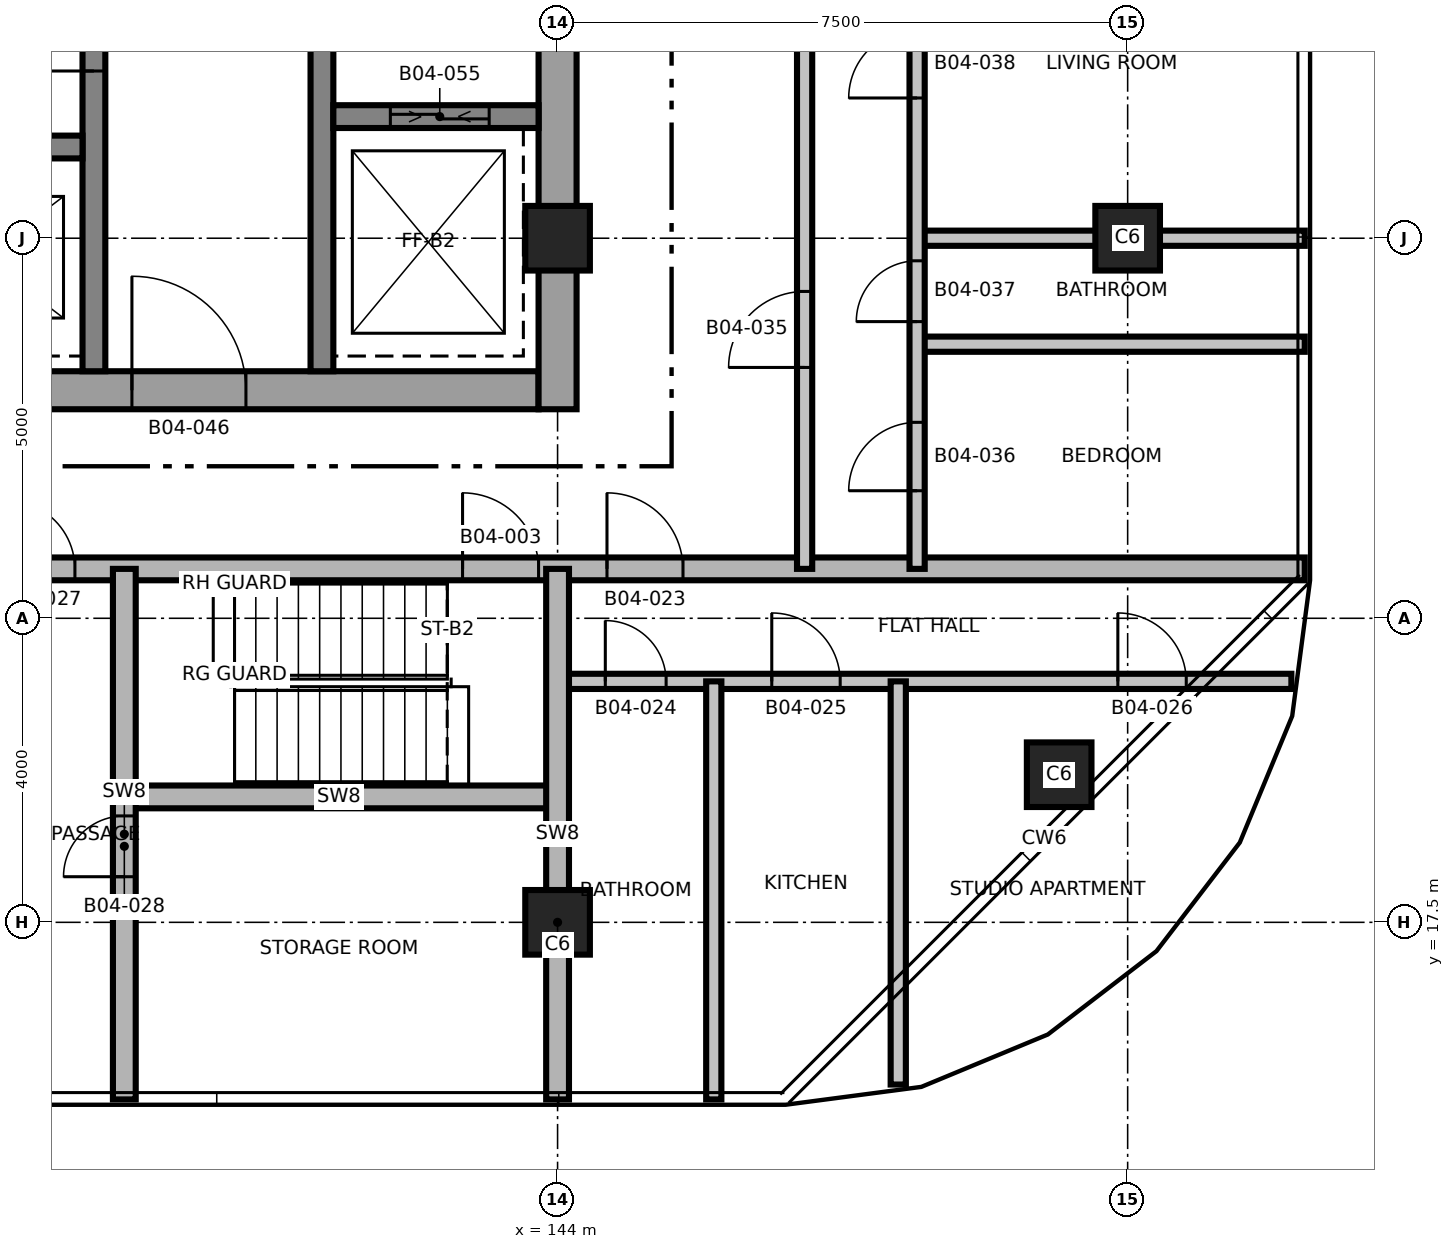
"""IFC4 building model, lengths in metres.
Left out: names, types, materials, properties, quantities, classifications, styles, units other than length and angle.
Written with IfcOpenShell. Run it as: python <this file> out.ifc"""

import sys

from ifc_helpers import new_model, si_unit, direction, frame, frame_2d, origin, origin_2d, place, context, subcontext, project, spatial, rectangle, extrude, element, fill, save


model = new_model("IFC4")
c1 = context("Model", 3, precision=1e-05, world=origin(), true_north=direction((0.0, 1.0)))
c2 = subcontext(c1, "Body", "Model", "MODEL_VIEW")
j1 = project(units=[si_unit("LENGTHUNIT", "METRE"), si_unit("PLANEANGLEUNIT", "RADIAN")], contexts=[c1])
p1 = place(None, origin())
s1 = spatial("IfcSite", under=j1, at=p1, CompositionType="ELEMENT")
p2 = place(p1, origin())
s2 = spatial("IfcBuilding", under=s1, at=p2, CompositionType="ELEMENT")
p3 = place(p2, frame((0.0, 0.0, 66.8)))
s3 = spatial("IfcBuildingStorey", under=s2, at=p3, CompositionType="ELEMENT", Elevation=66.8)
p4 = place(p3, frame((128.75, 24.5, 0.0), z_axis=(0.0, 0.0, 1.0), x_axis=(1.0, 0.0, 0.0)))
e1 = element("IfcWall", 1, at=p4, inside=s3, PredefinedType="SHEAR", context=c2, shape_type="SweptSolid", body=[
    extrude(rectangle(XDim=15.0, YDim=0.5, at=frame_2d((7.5, 0.0))), origin(), (0.0, 0.0, 1.0), 3.7),
])
p5 = place(p4, frame((9.65, 0.0, 0.0)))
e2 = element("IfcOpeningElement", 2, at=p5, cuts=e1, PredefinedType="OPENING", context=c2, shape_type="SweptSolid", body=[
    extrude(rectangle(XDim=1.5, YDim=2.1, at=frame_2d((0.75, 1.05))), frame((0.0, 0.26, 0.0), z_axis=(0.0, -1.0, 0.0), x_axis=(1.0, 0.0, 0.0)), (0.0, 0.0, 1.0), 0.52),
])
p6 = place(p4, frame((1.25, 0.0, 0.0)))
e3 = element("IfcOpeningElement", 3, at=p6, cuts=e1, PredefinedType="OPENING", context=c2, shape_type="SweptSolid", body=[
    extrude(rectangle(XDim=0.9, YDim=2.1, at=frame_2d((0.45, 1.05))), frame((0.0, 0.26, 0.0), z_axis=(0.0, -1.0, 0.0), x_axis=(1.0, 0.0, 0.0)), (0.0, 0.0, 1.0), 0.52),
])
p7 = place(p3, frame((144.0, 24.25, 0.0), z_axis=(0.0, 0.0, 1.0), x_axis=(0.0, 1.0, 0.0)))
e4 = element("IfcWall", 4, at=p7, inside=s3, PredefinedType="SHEAR", context=c2, shape_type="SweptSolid", body=[
    extrude(rectangle(XDim=13.5, YDim=0.5, at=frame_2d((6.75, 0.0))), origin(), (0.0, 0.0, 1.0), 3.7),
])
p8 = place(p3, frame((137.9, 24.75, 0.0), z_axis=(0.0, 0.0, 1.0), x_axis=(0.0, 1.0, 0.0)))
e5 = element("IfcWall", 5, at=p8, inside=s3, PredefinedType="SHEAR", context=c2, shape_type="SweptSolid", body=[
    extrude(rectangle(XDim=12.5, YDim=0.3, at=frame_2d((6.25, 0.0))), origin(), (0.0, 0.0, 1.0), 3.7),
])
p9 = place(p8, frame((3.95, 0.0, 0.0)))
e6 = element("IfcOpeningElement", 6, at=p9, cuts=e5, PredefinedType="OPENING", context=c2, shape_type="SweptSolid", body=[
    extrude(rectangle(XDim=1.5, YDim=2.1, at=frame_2d((0.75, 1.05))), frame((0.0, 0.16, 0.0), z_axis=(0.0, -1.0, 0.0), x_axis=(1.0, 0.0, 0.0)), (0.0, 0.0, 1.0), 0.32),
])
p10 = place(p8, frame((10.45, 0.0, 0.0)))
e7 = element("IfcOpeningElement", 7, at=p10, cuts=e5, PredefinedType="OPENING", context=c2, shape_type="SweptSolid", body=[
    extrude(rectangle(XDim=0.9, YDim=2.1, at=frame_2d((0.45, 1.05))), frame((0.0, 0.16, 0.0), z_axis=(0.0, -1.0, 0.0), x_axis=(1.0, 0.0, 0.0)), (0.0, 0.0, 1.0), 0.32),
])
p11 = place(p3, frame((140.9, 24.75, 0.0), z_axis=(0.0, 0.0, 1.0), x_axis=(0.0, 1.0, 0.0)))
e8 = element("IfcWall", 8, at=p11, inside=s3, PredefinedType="SHEAR", context=c2, shape_type="SweptSolid", body=[
    extrude(rectangle(XDim=12.5, YDim=0.3, at=frame_2d((6.25, 0.0))), origin(), (0.0, 0.0, 1.0), 3.7),
])
p12 = place(p11, frame((5.9, 0.0, 0.0)))
e9 = element("IfcOpeningElement", 9, at=p12, cuts=e8, PredefinedType="OPENING", context=c2, shape_type="SweptSolid", body=[
    extrude(rectangle(XDim=1.2, YDim=2.1, at=frame_2d((0.6, 1.05))), frame((0.0, 0.16, 0.0), z_axis=(0.0, -1.0, 0.0), x_axis=(1.0, 0.0, 0.0)), (0.0, 0.0, 1.0), 0.32),
])
p13 = place(p3, frame((132.25, 27.7, 0.0), z_axis=(0.0, 0.0, 1.0), x_axis=(1.0, 0.0, 0.0)))
e10 = element("IfcWall", 10, at=p13, inside=s3, PredefinedType="SHEAR", context=c2, shape_type="SweptSolid", body=[
    extrude(rectangle(XDim=5.5, YDim=0.3, at=frame_2d((2.75, 0.0))), origin(), (0.0, 0.0, 1.0), 3.7),
])
p14 = place(p13, frame((0.9, 0.0, 0.0)))
e11 = element("IfcOpeningElement", 11, at=p14, cuts=e10, PredefinedType="OPENING", context=c2, shape_type="SweptSolid", body=[
    extrude(rectangle(XDim=1.1, YDim=2.4, at=frame_2d((0.55, 1.2))), frame((0.0, 0.16, 0.0), z_axis=(0.0, -1.0, 0.0), x_axis=(1.0, 0.0, 0.0)), (0.0, 0.0, 1.0), 0.32),
])
p15 = place(p13, frame((3.8, 0.0, 0.0)))
e12 = element("IfcOpeningElement", 12, at=p15, cuts=e10, PredefinedType="OPENING", context=c2, shape_type="SweptSolid", body=[
    extrude(rectangle(XDim=1.1, YDim=2.4, at=frame_2d((0.55, 1.2))), frame((0.0, 0.16, 0.0), z_axis=(0.0, -1.0, 0.0), x_axis=(1.0, 0.0, 0.0)), (0.0, 0.0, 1.0), 0.32),
])
p16 = place(p3, frame((141.05, 28.1, 0.0), z_axis=(0.0, 0.0, 1.0), x_axis=(1.0, 0.0, 0.0)))
e13 = element("IfcWall", 13, at=p16, inside=s3, PredefinedType="SHEAR", context=c2, shape_type="SweptSolid", body=[
    extrude(rectangle(XDim=2.7, YDim=0.3, at=frame_2d((1.35, 0.0))), origin(), (0.0, 0.0, 1.0), 3.7),
])
p17 = place(p16, frame((0.75, 0.0, 0.0)))
e14 = element("IfcOpeningElement", 14, at=p17, cuts=e13, PredefinedType="OPENING", context=c2, shape_type="SweptSolid", body=[
    extrude(rectangle(XDim=1.3, YDim=2.4, at=frame_2d((0.65, 1.2))), frame((0.0, 0.16, 0.0), z_axis=(0.0, -1.0, 0.0), x_axis=(1.0, 0.0, 0.0)), (0.0, 0.0, 1.0), 0.32),
])
for number, where, z_axis, x_axis in (
    (15, (144.0, 17.5, 0.0), (0.0, 0.0, 1.0), (1.0, 0.0, 0.0)),
    (16, (150.599, 19.442, 0.0), (0.0, 0.0, 1.0), (1.0, 0.0, 0.0)),
    (17, (144.0, 26.5, 0.0), (0.0, 0.0, 1.0), (1.0, 0.0, 0.0)),
    (18, (151.5, 26.5, 0.0), (0.0, 0.0, 1.0), (1.0, 0.0, 0.0)),
):
    element("IfcColumn", number, at=place(p3, frame(where, z_axis=z_axis, x_axis=x_axis)), inside=s3, PredefinedType="COLUMN", context=c2, shape_type="SweptSolid", body=[
        extrude(rectangle(XDim=0.85, YDim=0.85, at=origin_2d()), origin(), (0.0, 0.0, 1.0), 3.7),
    ])
p18 = place(p3, frame((138.25, 19.15, 0.0), z_axis=(0.0, 0.0, 1.0), x_axis=(1.0, 0.0, 0.0)))
e19 = element("IfcWall", 19, at=p18, inside=s3, PredefinedType="SHEAR", context=c2, shape_type="SweptSolid", body=[
    extrude(rectangle(XDim=5.75, YDim=0.3, at=frame_2d((2.875, 0.0))), origin(), (0.0, 0.0, 1.0), 3.4),
])
p19 = place(p3, frame((144.0, 20.67, 0.0), z_axis=(0.0, 0.0, 1.0), x_axis=(1.0, 0.0, 0.0)))
e20 = element("IfcWall", 20, at=p19, inside=s3, PredefinedType="PARTITIONING", context=c2, shape_type="SweptSolid", body=[
    extrude(rectangle(XDim=9.654, YDim=0.2, at=frame_2d((4.827, 0.0))), origin(), (0.0, 0.0, 1.0), 3.4),
])
p20 = place(p19, frame((0.628, 0.0, 0.0)))
e21 = element("IfcOpeningElement", 21, at=p20, cuts=e20, PredefinedType="OPENING", context=c2, shape_type="SweptSolid", body=[
    extrude(rectangle(XDim=0.8, YDim=2.1, at=frame_2d((0.4, 1.05))), frame((0.0, 0.11, 0.0), z_axis=(0.0, -1.0, 0.0), x_axis=(1.0, 0.0, 0.0)), (0.0, 0.0, 1.0), 0.22),
])
p21 = place(p19, frame((2.818, 0.0, 0.0)))
e22 = element("IfcOpeningElement", 22, at=p21, cuts=e20, PredefinedType="OPENING", context=c2, shape_type="SweptSolid", body=[
    extrude(rectangle(XDim=0.9, YDim=2.1, at=frame_2d((0.45, 1.05))), frame((0.0, 0.11, 0.0), z_axis=(0.0, -1.0, 0.0), x_axis=(1.0, 0.0, 0.0)), (0.0, 0.0, 1.0), 0.22),
])
p22 = place(p19, frame((7.371, 0.0, 0.0)))
e23 = element("IfcOpeningElement", 23, at=p22, cuts=e20, PredefinedType="OPENING", context=c2, shape_type="SweptSolid", body=[
    extrude(rectangle(XDim=0.9, YDim=2.1, at=frame_2d((0.45, 1.05))), frame((0.0, 0.11, 0.0), z_axis=(0.0, -1.0, 0.0), x_axis=(1.0, 0.0, 0.0)), (0.0, 0.0, 1.0), 0.22),
])
p23 = place(p3, frame((119.17, 22.15, 0.0), z_axis=(0.0, 0.0, 1.0), x_axis=(1.0, 0.0, 0.0)))
e24 = element("IfcWall", 24, at=p23, inside=s3, PredefinedType="SHEAR", context=c2, shape_type="SweptSolid", body=[
    extrude(rectangle(XDim=34.66, YDim=0.3, at=frame_2d((17.33, 0.0))), origin(), (0.0, 0.0, 1.0), 3.4),
])
p24 = place(p23, frame((23.58, 0.0, 0.0)))
e25 = element("IfcOpeningElement", 25, at=p24, cuts=e24, PredefinedType="OPENING", context=c2, shape_type="SweptSolid", body=[
    extrude(rectangle(XDim=1.0, YDim=2.1, at=frame_2d((0.5, 1.05))), frame((0.0, 0.16, 0.0), z_axis=(0.0, -1.0, 0.0), x_axis=(1.0, 0.0, 0.0)), (0.0, 0.0, 1.0), 0.32),
])
p25 = place(p23, frame((11.93, 0.0, 0.0)))
e26 = element("IfcOpeningElement", 26, at=p25, cuts=e24, PredefinedType="OPENING", context=c2, shape_type="SweptSolid", body=[
    extrude(rectangle(XDim=1.0, YDim=2.1, at=frame_2d((0.5, 1.05))), frame((0.0, 0.16, 0.0), z_axis=(0.0, -1.0, 0.0), x_axis=(1.0, 0.0, 0.0)), (0.0, 0.0, 1.0), 0.32),
])
p26 = place(p23, frame((25.48, 0.0, 0.0)))
e27 = element("IfcOpeningElement", 27, at=p26, cuts=e24, PredefinedType="OPENING", context=c2, shape_type="SweptSolid", body=[
    extrude(rectangle(XDim=1.0, YDim=2.1, at=frame_2d((0.5, 1.05))), frame((0.0, 0.16, 0.0), z_axis=(0.0, -1.0, 0.0), x_axis=(1.0, 0.0, 0.0)), (0.0, 0.0, 1.0), 0.32),
])
p27 = place(p23, frame((17.58, 0.0, 0.0)))
e28 = element("IfcOpeningElement", 28, at=p27, cuts=e24, PredefinedType="OPENING", context=c2, shape_type="SweptSolid", body=[
    extrude(rectangle(XDim=0.9, YDim=2.1, at=frame_2d((0.45, 1.05))), frame((0.0, 0.16, 0.0), z_axis=(0.0, -1.0, 0.0), x_axis=(1.0, 0.0, 0.0)), (0.0, 0.0, 1.0), 0.32),
])
for number, where, z_axis, x_axis in (
    (29, (148.73, 25.106, 0.0), (0.0, 0.0, 1.0), (1.0, 0.0, 0.0)),
    (30, (148.73, 26.5, 0.0), (0.0, 0.0, 1.0), (1.0, 0.0, 0.0)),
):
    element("IfcWall", number, at=place(p3, frame(where, z_axis=z_axis, x_axis=x_axis)), inside=s3, PredefinedType="PARTITIONING", context=c2, shape_type="SweptSolid", body=[
        extrude(rectangle(XDim=5.1, YDim=0.2, at=frame_2d((2.55, 0.0))), origin(), (0.0, 0.0, 1.0), 3.4),
    ])
p28 = place(p3, frame((138.3, 15.17, 0.0), z_axis=(0.0, 0.0, 1.0), x_axis=(0.0, 1.0, 0.0)))
e31 = element("IfcWall", 31, at=p28, inside=s3, PredefinedType="SHEAR", context=c2, shape_type="SweptSolid", body=[
    extrude(rectangle(XDim=6.98, YDim=0.3, at=frame_2d((3.49, 0.0))), origin(), (0.0, 0.0, 1.0), 3.4),
])
p29 = place(p28, frame((2.93, 0.0, 0.0)))
e32 = element("IfcOpeningElement", 32, at=p29, cuts=e31, PredefinedType="OPENING", context=c2, shape_type="SweptSolid", body=[
    extrude(rectangle(XDim=0.8, YDim=2.1, at=frame_2d((0.4, 1.05))), frame((0.0, 0.16, 0.0), z_axis=(0.0, -1.0, 0.0), x_axis=(1.0, 0.0, 0.0)), (0.0, 0.0, 1.0), 0.32),
])
p30 = place(p3, frame((144.0, 15.17, 0.0), z_axis=(0.0, 0.0, 1.0), x_axis=(0.0, 1.0, 0.0)))
e33 = element("IfcWall", 33, at=p30, inside=s3, PredefinedType="SHEAR", context=c2, shape_type="SweptSolid", body=[
    extrude(rectangle(XDim=6.98, YDim=0.3, at=frame_2d((3.49, 0.0))), origin(), (0.0, 0.0, 1.0), 3.4),
])
p31 = place(p3, frame((146.055, 15.17, 0.0), z_axis=(0.0, 0.0, 1.0), x_axis=(0.0, 1.0, 0.0)))
e34 = element("IfcWall", 34, at=p31, inside=s3, PredefinedType="PARTITIONING", context=c2, shape_type="SweptSolid", body=[
    extrude(rectangle(XDim=5.5, YDim=0.2, at=frame_2d((2.75, 0.0))), origin(), (0.0, 0.0, 1.0), 3.4),
])
p32 = place(p3, frame((147.25, 22.15, 0.0), z_axis=(0.0, 0.0, 1.0), x_axis=(0.0, 1.0, 0.0)))
e35 = element("IfcWall", 35, at=p32, inside=s3, PredefinedType="PARTITIONING", context=c2, shape_type="SweptSolid", body=[
    extrude(rectangle(XDim=17.7, YDim=0.2, at=frame_2d((8.85, 0.0))), origin(), (0.0, 0.0, 1.0), 3.4),
])
p33 = place(p32, frame((2.65, 0.0, 0.0)))
e36 = element("IfcOpeningElement", 36, at=p33, cuts=e35, PredefinedType="OPENING", context=c2, shape_type="SweptSolid", body=[
    extrude(rectangle(XDim=1.0, YDim=2.1, at=frame_2d((0.5, 1.05))), frame((0.0, 0.11, 0.0), z_axis=(0.0, -1.0, 0.0), x_axis=(1.0, 0.0, 0.0)), (0.0, 0.0, 1.0), 0.22),
])
p34 = place(p3, frame((148.482, 15.366, 0.0), z_axis=(0.0, 0.0, 1.0), x_axis=(0.0, 1.0, 0.0)))
e37 = element("IfcWall", 37, at=p34, inside=s3, PredefinedType="PARTITIONING", context=c2, shape_type="SweptSolid", body=[
    extrude(rectangle(XDim=5.304, YDim=0.2, at=frame_2d((2.652, 0.0))), origin(), (0.0, 0.0, 1.0), 3.4),
])
p35 = place(p3, frame((148.73, 22.15, 0.0), z_axis=(0.0, 0.0, 1.0), x_axis=(0.0, 1.0, 0.0)))
e38 = element("IfcWall", 38, at=p35, inside=s3, PredefinedType="PARTITIONING", context=c2, shape_type="SweptSolid", body=[
    extrude(rectangle(XDim=17.7, YDim=0.2, at=frame_2d((8.85, 0.0))), origin(), (0.0, 0.0, 1.0), 3.4),
])
p36 = place(p35, frame((1.028, 0.0, 0.0)))
e39 = element("IfcOpeningElement", 39, at=p36, cuts=e38, PredefinedType="OPENING", context=c2, shape_type="SweptSolid", body=[
    extrude(rectangle(XDim=0.9, YDim=2.1, at=frame_2d((0.45, 1.05))), frame((0.0, 0.11, 0.0), z_axis=(0.0, -1.0, 0.0), x_axis=(1.0, 0.0, 0.0)), (0.0, 0.0, 1.0), 0.22),
])
p37 = place(p35, frame((3.253, 0.0, 0.0)))
e40 = element("IfcOpeningElement", 40, at=p37, cuts=e38, PredefinedType="OPENING", context=c2, shape_type="SweptSolid", body=[
    extrude(rectangle(XDim=0.8, YDim=2.1, at=frame_2d((0.4, 1.05))), frame((0.0, 0.11, 0.0), z_axis=(0.0, -1.0, 0.0), x_axis=(1.0, 0.0, 0.0)), (0.0, 0.0, 1.0), 0.22),
])
p38 = place(p35, frame((6.195, 0.0, 0.0)))
e41 = element("IfcOpeningElement", 41, at=p38, cuts=e38, PredefinedType="OPENING", context=c2, shape_type="SweptSolid", body=[
    extrude(rectangle(XDim=0.9, YDim=2.1, at=frame_2d((0.45, 1.05))), frame((0.0, 0.11, 0.0), z_axis=(0.0, -1.0, 0.0), x_axis=(1.0, 0.0, 0.0)), (0.0, 0.0, 1.0), 0.22),
])
p39 = place(p35, frame((9.641, 0.0, 0.0)))
e42 = element("IfcOpeningElement", 42, at=p39, cuts=e38, PredefinedType="OPENING", context=c2, shape_type="SweptSolid", body=[
    extrude(rectangle(XDim=0.9, YDim=2.1, at=frame_2d((0.45, 1.05))), frame((0.0, 0.11, 0.0), z_axis=(0.0, -1.0, 0.0), x_axis=(1.0, 0.0, 0.0)), (0.0, 0.0, 1.0), 0.22),
])
p40 = place(p35, frame((11.895, 0.0, 0.0)))
e43 = element("IfcOpeningElement", 43, at=p40, cuts=e38, PredefinedType="OPENING", context=c2, shape_type="SweptSolid", body=[
    extrude(rectangle(XDim=0.8, YDim=2.1, at=frame_2d((0.4, 1.05))), frame((0.0, 0.11, 0.0), z_axis=(0.0, -1.0, 0.0), x_axis=(1.0, 0.0, 0.0)), (0.0, 0.0, 1.0), 0.22),
])
p41 = place(p35, frame((15.075, 0.0, 0.0)))
e44 = element("IfcOpeningElement", 44, at=p41, cuts=e38, PredefinedType="OPENING", context=c2, shape_type="SweptSolid", body=[
    extrude(rectangle(XDim=0.9, YDim=2.1, at=frame_2d((0.45, 1.05))), frame((0.0, 0.11, 0.0), z_axis=(0.0, -1.0, 0.0), x_axis=(1.0, 0.0, 0.0)), (0.0, 0.0, 1.0), 0.22),
])
p42 = place(p24, origin())
e45 = element("IfcDoor", 45, at=p42, inside=s3, OperationType="SINGLE_SWING_LEFT", PredefinedType="DOOR", context=c2, shape_type="SweptSolid", body=[
    extrude(rectangle(XDim=1.0, YDim=2.1, at=frame_2d((0.5, 1.05))), frame((0.0, 0.025, 0.0), z_axis=(0.0, -1.0, 0.0), x_axis=(1.0, 0.0, 0.0)), (0.0, 0.0, 1.0), 0.05),
])
fill(e25, e45)
p43 = place(p26, origin())
e46 = element("IfcDoor", 46, at=p43, inside=s3, OperationType="SINGLE_SWING_LEFT", PredefinedType="DOOR", context=c2, shape_type="SweptSolid", body=[
    extrude(rectangle(XDim=1.0, YDim=2.1, at=frame_2d((0.5, 1.05))), frame((0.0, 0.025, 0.0), z_axis=(0.0, -1.0, 0.0), x_axis=(1.0, 0.0, 0.0)), (0.0, 0.0, 1.0), 0.05),
])
fill(e27, e46)
p44 = place(p20, origin())
e47 = element("IfcDoor", 47, at=p44, inside=s3, OperationType="SINGLE_SWING_RIGHT", PredefinedType="DOOR", context=c2, shape_type="SweptSolid", body=[
    extrude(rectangle(XDim=0.8, YDim=2.1, at=frame_2d((0.4, 1.05))), frame((0.0, 0.025, 0.0), z_axis=(0.0, -1.0, 0.0), x_axis=(1.0, 0.0, 0.0)), (0.0, 0.0, 1.0), 0.05),
])
fill(e21, e47)
p45 = place(p21, origin())
e48 = element("IfcDoor", 48, at=p45, inside=s3, OperationType="SINGLE_SWING_LEFT", PredefinedType="DOOR", context=c2, shape_type="SweptSolid", body=[
    extrude(rectangle(XDim=0.9, YDim=2.1, at=frame_2d((0.45, 1.05))), frame((0.0, 0.025, 0.0), z_axis=(0.0, -1.0, 0.0), x_axis=(1.0, 0.0, 0.0)), (0.0, 0.0, 1.0), 0.05),
])
fill(e22, e48)
p46 = place(p22, origin())
e49 = element("IfcDoor", 49, at=p46, inside=s3, OperationType="SINGLE_SWING_RIGHT", PredefinedType="DOOR", context=c2, shape_type="SweptSolid", body=[
    extrude(rectangle(XDim=0.9, YDim=2.1, at=frame_2d((0.45, 1.05))), frame((0.0, 0.025, 0.0), z_axis=(0.0, -1.0, 0.0), x_axis=(1.0, 0.0, 0.0)), (0.0, 0.0, 1.0), 0.05),
])
fill(e23, e49)
p47 = place(p27, origin())
e50 = element("IfcDoor", 50, at=p47, inside=s3, OperationType="SINGLE_SWING_LEFT", PredefinedType="DOOR", context=c2, shape_type="SweptSolid", body=[
    extrude(rectangle(XDim=0.9, YDim=2.1, at=frame_2d((0.45, 1.05))), frame((0.0, 0.025, 0.0), z_axis=(0.0, -1.0, 0.0), x_axis=(1.0, 0.0, 0.0)), (0.0, 0.0, 1.0), 0.05),
])
fill(e28, e50)
p48 = place(p29, origin())
e51 = element("IfcDoor", 51, at=p48, inside=s3, OperationType="SINGLE_SWING_RIGHT", PredefinedType="DOOR", context=c2, shape_type="SweptSolid", body=[
    extrude(rectangle(XDim=0.8, YDim=2.1, at=frame_2d((0.4, 1.05))), frame((0.0, 0.025, 0.0), z_axis=(0.0, -1.0, 0.0), x_axis=(1.0, 0.0, 0.0)), (0.0, 0.0, 1.0), 0.05),
])
fill(e32, e51)
p49 = place(p33, origin())
e52 = element("IfcDoor", 52, at=p49, inside=s3, OperationType="SINGLE_SWING_LEFT", PredefinedType="DOOR", context=c2, shape_type="SweptSolid", body=[
    extrude(rectangle(XDim=1.0, YDim=2.1, at=frame_2d((0.5, 1.05))), frame((0.0, 0.025, 0.0), z_axis=(0.0, -1.0, 0.0), x_axis=(1.0, 0.0, 0.0)), (0.0, 0.0, 1.0), 0.05),
])
fill(e36, e52)
p50 = place(p36, origin())
e53 = element("IfcDoor", 53, at=p50, inside=s3, OperationType="SINGLE_SWING_RIGHT", PredefinedType="DOOR", context=c2, shape_type="SweptSolid", body=[
    extrude(rectangle(XDim=0.9, YDim=2.1, at=frame_2d((0.45, 1.05))), frame((0.0, 0.025, 0.0), z_axis=(0.0, -1.0, 0.0), x_axis=(1.0, 0.0, 0.0)), (0.0, 0.0, 1.0), 0.05),
])
fill(e39, e53)
p51 = place(p37, origin())
e54 = element("IfcDoor", 54, at=p51, inside=s3, OperationType="SINGLE_SWING_LEFT", PredefinedType="DOOR", context=c2, shape_type="SweptSolid", body=[
    extrude(rectangle(XDim=0.8, YDim=2.1, at=frame_2d((0.4, 1.05))), frame((0.0, 0.025, 0.0), z_axis=(0.0, -1.0, 0.0), x_axis=(1.0, 0.0, 0.0)), (0.0, 0.0, 1.0), 0.05),
])
fill(e40, e54)
p52 = place(p38, origin())
e55 = element("IfcDoor", 55, at=p52, inside=s3, OperationType="SINGLE_SWING_RIGHT", PredefinedType="DOOR", context=c2, shape_type="SweptSolid", body=[
    extrude(rectangle(XDim=0.9, YDim=2.1, at=frame_2d((0.45, 1.05))), frame((0.0, 0.025, 0.0), z_axis=(0.0, -1.0, 0.0), x_axis=(1.0, 0.0, 0.0)), (0.0, 0.0, 1.0), 0.05),
])
fill(e41, e55)
p53 = place(p9, origin())
e56 = element("IfcDoor", 56, at=p53, inside=s3, OperationType="SINGLE_SWING_RIGHT", PredefinedType="DOOR", context=c2, shape_type="SweptSolid", body=[
    extrude(rectangle(XDim=1.5, YDim=2.1, at=frame_2d((0.75, 1.05))), frame((0.0, 0.025, 0.0), z_axis=(0.0, -1.0, 0.0), x_axis=(1.0, 0.0, 0.0)), (0.0, 0.0, 1.0), 0.05),
])
fill(e6, e56)
p54 = place(p5, origin())
e57 = element("IfcDoor", 57, at=p54, inside=s3, OperationType="SINGLE_SWING_LEFT", PredefinedType="DOOR", context=c2, shape_type="SweptSolid", body=[
    extrude(rectangle(XDim=1.5, YDim=2.1, at=frame_2d((0.75, 1.05))), frame((0.0, 0.025, 0.0), z_axis=(0.0, -1.0, 0.0), x_axis=(1.0, 0.0, 0.0)), (0.0, 0.0, 1.0), 0.05),
])
fill(e2, e57)
p55 = place(p17, origin())
e58 = element("IfcDoor", 58, at=p55, inside=s3, OperationType="SLIDING_TO_LEFT", PredefinedType="DOOR", context=c2, shape_type="SweptSolid", body=[
    extrude(rectangle(XDim=1.3, YDim=2.4, at=frame_2d((0.65, 1.2))), frame((0.0, 0.025, 0.0), z_axis=(0.0, -1.0, 0.0), x_axis=(1.0, 0.0, 0.0)), (0.0, 0.0, 1.0), 0.05),
])
fill(e14, e58)
save(model, sys.argv[1])
